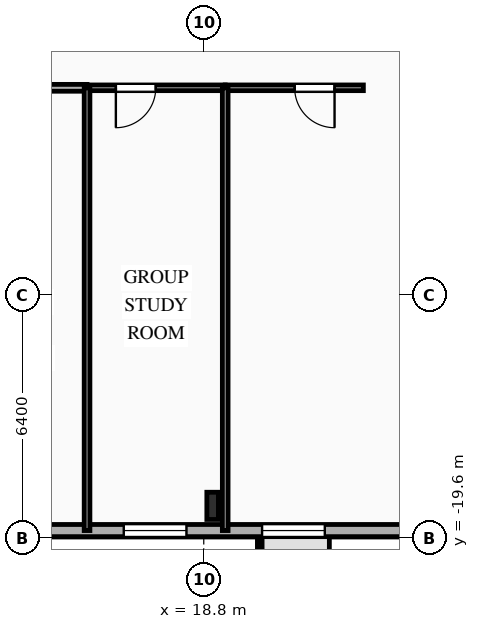
"""IFC4 building model, lengths in metres.
Left out: names, types, materials, properties, quantities, classifications, styles, units other than length and angle.
Written with IfcOpenShell. Run it as: python <this file> out.ifc"""

import sys

from ifc_helpers import new_model, si_unit, direction, frame, frame_2d, origin, origin_2d, place, context, subcontext, project, spatial, rectangle, i_section, extrude, element, fill, save


model = new_model("IFC4")
c1 = context("Model", 3, precision=1e-05, world=origin(), true_north=direction((0.0, 1.0)))
c2 = subcontext(c1, "Body", "Model", "MODEL_VIEW")
j1 = project(units=[si_unit("LENGTHUNIT", "METRE"), si_unit("PLANEANGLEUNIT", "RADIAN")], contexts=[c1])
p1 = place(None, origin())
s1 = spatial("IfcSite", under=j1, at=p1, CompositionType="ELEMENT")
p2 = place(p1, origin())
s2 = spatial("IfcBuilding", under=s1, at=p2, CompositionType="ELEMENT")
p3 = place(p2, frame((0.0, 0.0, 57.15)))
s3 = spatial("IfcBuildingStorey", under=s2, at=p3, CompositionType="ELEMENT", Elevation=57.15)
p4 = place(p3, frame((19.033, -18.75, 0.0), z_axis=(0.0, 0.0, 1.0), x_axis=(1.0, 0.0, 0.0)))
e1 = element("IfcColumn", 1, at=p4, inside=s3, PredefinedType="COLUMN", context=c2, shape_type="SweptSolid", body=[
    extrude(i_section(OverallWidth=0.304, OverallDepth=0.716, WebThickness=0.021, FlangeThickness=0.04, FilletRadius=0.027, at=origin_2d()), origin(), (0.0, 0.0, 1.0), 3.35),
])
p5 = place(p3, frame((29.2, -19.4, 0.0), z_axis=(0.0, 0.0, 1.0), x_axis=(-1.0, 0.0, 0.0)))
e2 = element("IfcWall", 2, at=p5, inside=s3, PredefinedType="SOLIDWALL", context=c2, shape_type="SweptSolid", body=[
    extrude(rectangle(XDim=58.4, YDim=0.32, at=frame_2d((29.2, 0.0))), origin(), (0.0, 0.0, 1.0), 3.035),
])
p6 = place(p5, frame((7.215, 0.0, 0.85)))
e3 = element("IfcOpeningElement", 3, at=p6, cuts=e2, PredefinedType="OPENING", context=c2, shape_type="SweptSolid", body=[
    extrude(rectangle(XDim=1.65, YDim=1.85, at=frame_2d((0.825, 0.925))), frame((0.0, 0.17, 0.0), z_axis=(0.0, -1.0, 0.0), x_axis=(1.0, 0.0, 0.0)), (0.0, 0.0, 1.0), 0.34),
])
p7 = place(p5, frame((10.855, 0.0, 0.85)))
e4 = element("IfcOpeningElement", 4, at=p7, cuts=e2, PredefinedType="OPENING", context=c2, shape_type="SweptSolid", body=[
    extrude(rectangle(XDim=1.65, YDim=1.85, at=frame_2d((0.825, 0.925))), frame((0.0, 0.17, 0.0), z_axis=(0.0, -1.0, 0.0), x_axis=(1.0, 0.0, 0.0)), (0.0, 0.0, 1.0), 0.34),
])
p8 = place(p5, frame((15.7, 0.0, 0.85)))
e5 = element("IfcOpeningElement", 5, at=p8, cuts=e2, PredefinedType="OPENING", context=c2, shape_type="SweptSolid", body=[
    extrude(rectangle(XDim=2.2, YDim=1.85, at=frame_2d((1.1, 0.925))), frame((0.0, 0.17, 0.0), z_axis=(0.0, -1.0, 0.0), x_axis=(1.0, 0.0, 0.0)), (0.0, 0.0, 1.0), 0.34),
])
p9 = place(p5, frame((22.26, 0.0, 0.85)))
e6 = element("IfcOpeningElement", 6, at=p9, cuts=e2, PredefinedType="OPENING", context=c2, shape_type="SweptSolid", body=[
    extrude(rectangle(XDim=2.2, YDim=1.85, at=frame_2d((1.1, 0.925))), frame((0.0, 0.17, 0.0), z_axis=(0.0, -1.0, 0.0), x_axis=(1.0, 0.0, 0.0)), (0.0, 0.0, 1.0), 0.34),
])
p10 = place(p5, frame((29.408, 0.0, 0.85)))
e7 = element("IfcOpeningElement", 7, at=p10, cuts=e2, PredefinedType="OPENING", context=c2, shape_type="SweptSolid", body=[
    extrude(rectangle(XDim=2.2, YDim=1.85, at=frame_2d((1.1, 0.925))), frame((0.0, 0.17, 0.0), z_axis=(0.0, -1.0, 0.0), x_axis=(1.0, 0.0, 0.0)), (0.0, 0.0, 1.0), 0.34),
])
p11 = place(p5, frame((35.38, 0.0, 0.85)))
e8 = element("IfcOpeningElement", 8, at=p11, cuts=e2, PredefinedType="OPENING", context=c2, shape_type="SweptSolid", body=[
    extrude(rectangle(XDim=2.2, YDim=1.85, at=frame_2d((1.1, 0.925))), frame((0.0, 0.17, 0.0), z_axis=(0.0, -1.0, 0.0), x_axis=(1.0, 0.0, 0.0)), (0.0, 0.0, 1.0), 0.34),
])
p12 = place(p5, frame((41.98, 0.0, 0.85)))
e9 = element("IfcOpeningElement", 9, at=p12, cuts=e2, PredefinedType="OPENING", context=c2, shape_type="SweptSolid", body=[
    extrude(rectangle(XDim=2.2, YDim=1.85, at=frame_2d((1.1, 0.925))), frame((0.0, 0.17, 0.0), z_axis=(0.0, -1.0, 0.0), x_axis=(1.0, 0.0, 0.0)), (0.0, 0.0, 1.0), 0.34),
])
p13 = place(p5, frame((48.495, 0.0, 0.85)))
e10 = element("IfcOpeningElement", 10, at=p13, cuts=e2, PredefinedType="OPENING", context=c2, shape_type="SweptSolid", body=[
    extrude(rectangle(XDim=1.65, YDim=1.85, at=frame_2d((0.825, 0.925))), frame((0.0, 0.17, 0.0), z_axis=(0.0, -1.0, 0.0), x_axis=(1.0, 0.0, 0.0)), (0.0, 0.0, 1.0), 0.34),
])
p14 = place(p3, frame((15.729, -7.75, 0.0), z_axis=(0.0, 0.0, 1.0), x_axis=(-1.0, 0.0, 0.0)))
e11 = element("IfcWall", 11, at=p14, inside=s3, PredefinedType="PARTITIONING", context=c2, shape_type="SweptSolid", body=[
    extrude(rectangle(XDim=4.122, YDim=0.18, at=frame_2d((2.061, 0.0))), origin(), (0.0, 0.0, 1.0), 3.035),
])
p15 = place(p14, frame((1.316, 0.0, 0.0)))
e12 = element("IfcOpeningElement", 12, at=p15, cuts=e11, PredefinedType="OPENING", context=c2, shape_type="SweptSolid", body=[
    extrude(rectangle(XDim=1.0, YDim=2.15, at=frame_2d((0.5, 1.075))), frame((0.0, 0.1, 0.0), z_axis=(0.0, -1.0, 0.0), x_axis=(1.0, 0.0, 0.0)), (0.0, 0.0, 1.0), 0.2),
])
p16 = place(p3, frame((19.365, -7.75, 0.0), z_axis=(0.0, 0.0, 1.0), x_axis=(-1.0, 0.0, 0.0)))
e13 = element("IfcWall", 13, at=p16, inside=s3, PredefinedType="PARTITIONING", context=c2, shape_type="SweptSolid", body=[
    extrude(rectangle(XDim=3.635, YDim=0.15, at=frame_2d((1.818, 0.0))), origin(), (0.0, 0.0, 1.0), 3.035),
])
p17 = place(p16, frame((1.827, 0.0, 0.0)))
e14 = element("IfcOpeningElement", 14, at=p17, cuts=e13, PredefinedType="OPENING", context=c2, shape_type="SweptSolid", body=[
    extrude(rectangle(XDim=1.05, YDim=2.15, at=frame_2d((0.525, 1.075))), frame((0.0, 0.085, 0.0), z_axis=(0.0, -1.0, 0.0), x_axis=(1.0, 0.0, 0.0)), (0.0, 0.0, 1.0), 0.17),
])
p18 = place(p3, frame((23.0, -7.75, 0.0), z_axis=(0.0, 0.0, 1.0), x_axis=(-1.0, 0.0, 0.0)))
e15 = element("IfcWall", 15, at=p18, inside=s3, PredefinedType="PARTITIONING", context=c2, shape_type="SweptSolid", body=[
    extrude(rectangle(XDim=3.635, YDim=0.15, at=frame_2d((1.818, 0.0))), origin(), (0.0, 0.0, 1.0), 3.035),
])
p19 = place(p18, frame((0.758, 0.0, 0.0)))
e16 = element("IfcOpeningElement", 16, at=p19, cuts=e15, PredefinedType="OPENING", context=c2, shape_type="SweptSolid", body=[
    extrude(rectangle(XDim=1.05, YDim=2.15, at=frame_2d((0.525, 1.075))), frame((0.0, 0.085, 0.0), z_axis=(0.0, -1.0, 0.0), x_axis=(1.0, 0.0, 0.0)), (0.0, 0.0, 1.0), 0.17),
])
for number, where, z_axis, x_axis in (
    (17, (15.729, -7.75, 0.0), (0.0, 0.0, 1.0), (0.0, -1.0, 0.0)),
    (18, (19.365, -7.75, 0.0), (0.0, 0.0, 1.0), (0.0, -1.0, 0.0)),
):
    element("IfcWall", number, at=place(p3, frame(where, z_axis=z_axis, x_axis=x_axis)), inside=s3, PredefinedType="PARTITIONING", context=c2, shape_type="SweptSolid", body=[
        extrude(rectangle(XDim=11.65, YDim=0.15, at=frame_2d((5.825, 0.0))), origin(), (0.0, 0.0, 1.0), 3.035),
    ])
p20 = place(p6, origin())
e19 = element("IfcWindow", 19, at=p20, inside=s3, PartitioningType="SINGLE_PANEL", PredefinedType="WINDOW", context=c2, shape_type="SweptSolid", body=[
    extrude(rectangle(XDim=1.65, YDim=1.85, at=frame_2d((0.825, 0.925))), frame((0.0, 0.03, 0.0), z_axis=(0.0, -1.0, 0.0), x_axis=(1.0, 0.0, 0.0)), (0.0, 0.0, 1.0), 0.06),
])
fill(e3, e19)
p21 = place(p7, origin())
e20 = element("IfcWindow", 20, at=p21, inside=s3, PartitioningType="SINGLE_PANEL", PredefinedType="WINDOW", context=c2, shape_type="SweptSolid", body=[
    extrude(rectangle(XDim=1.65, YDim=1.85, at=frame_2d((0.825, 0.925))), frame((0.0, 0.03, 0.0), z_axis=(0.0, -1.0, 0.0), x_axis=(1.0, 0.0, 0.0)), (0.0, 0.0, 1.0), 0.06),
])
fill(e4, e20)
p22 = place(p17, origin())
e21 = element("IfcDoor", 21, at=p22, inside=s3, OperationType="SINGLE_SWING_RIGHT", PredefinedType="DOOR", context=c2, shape_type="SweptSolid", body=[
    extrude(rectangle(XDim=1.05, YDim=2.15, at=frame_2d((0.525, 1.075))), frame((0.0, 0.025, 0.0), z_axis=(0.0, -1.0, 0.0), x_axis=(1.0, 0.0, 0.0)), (0.0, 0.0, 1.0), 0.05),
])
fill(e14, e21)
p23 = place(p19, origin())
e22 = element("IfcDoor", 22, at=p23, inside=s3, OperationType="SINGLE_SWING_LEFT", PredefinedType="DOOR", context=c2, shape_type="SweptSolid", body=[
    extrude(rectangle(XDim=1.05, YDim=2.15, at=frame_2d((0.525, 1.075))), frame((0.0, 0.025, 0.0), z_axis=(0.0, -1.0, 0.0), x_axis=(1.0, 0.0, 0.0)), (0.0, 0.0, 1.0), 0.05),
])
fill(e16, e22)
save(model, sys.argv[1])
